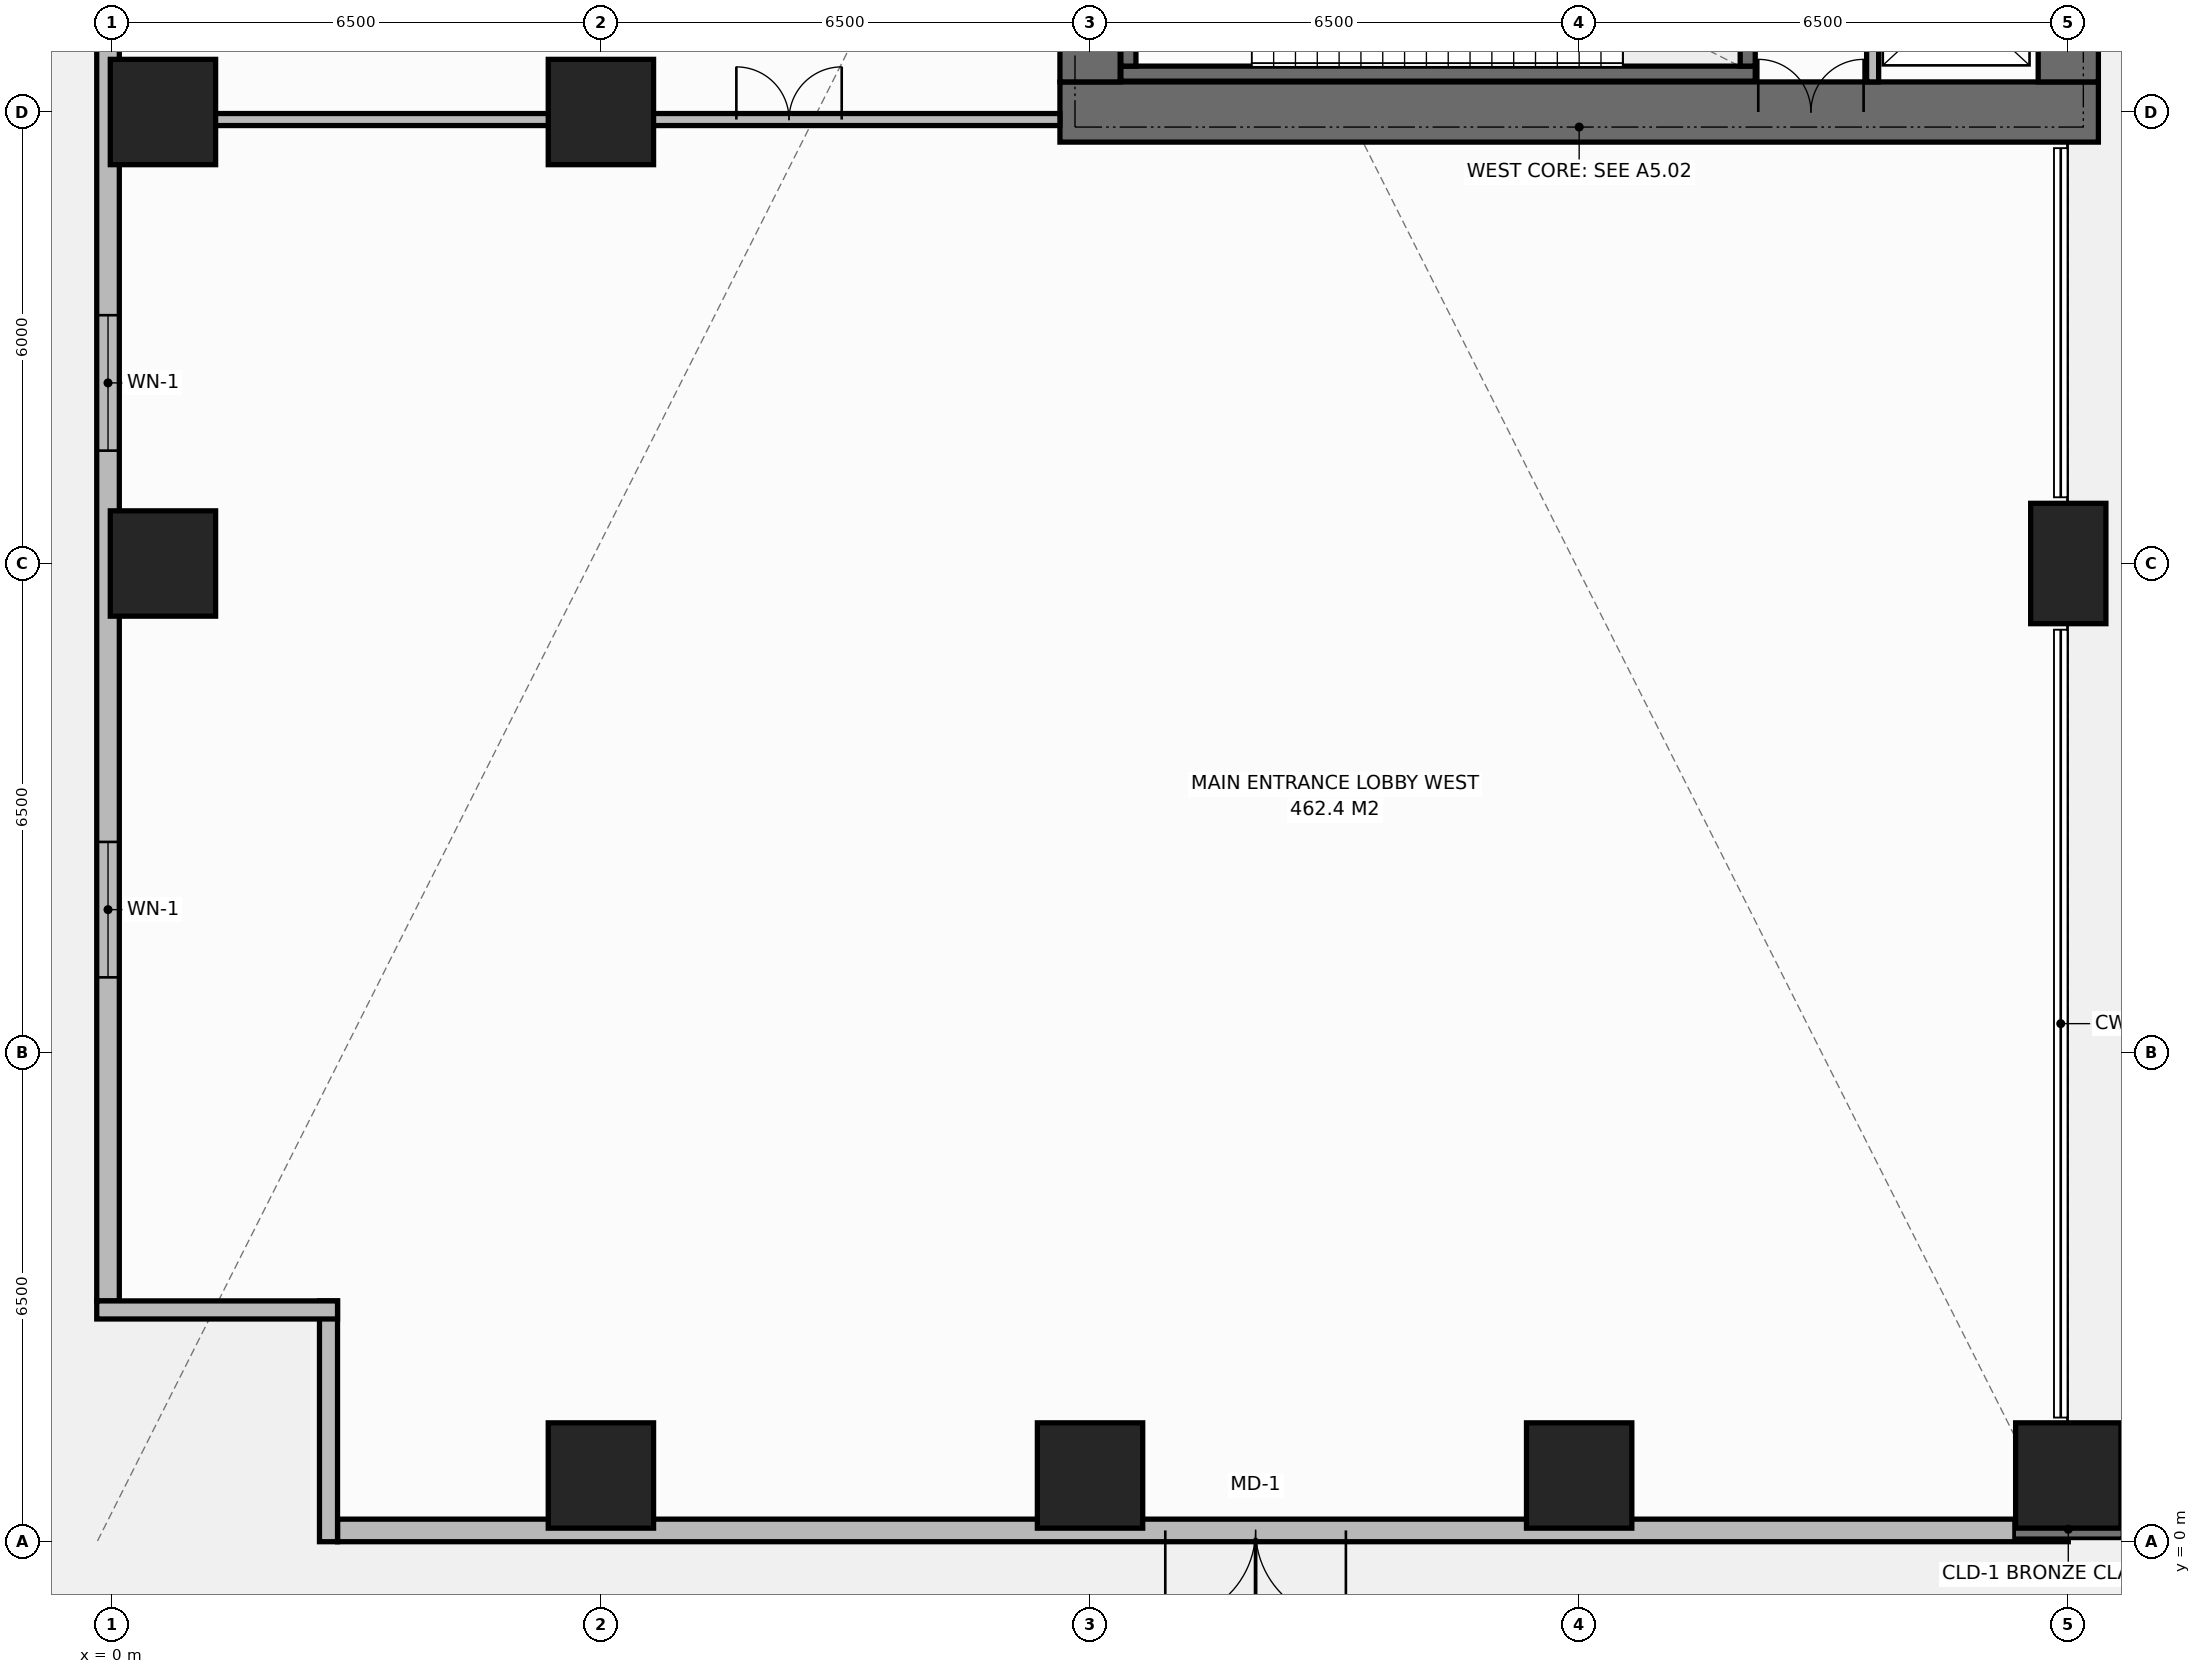
"""IFC4 building model, lengths in metres.
Left out: names, types, materials, properties, quantities, classifications, styles, units other than length and angle.
Written with IfcOpenShell. Run it as: python <this file> out.ifc"""

import sys

from ifc_helpers import new_model, si_unit, direction, frame, frame_2d, origin, origin_2d, place, context, subcontext, project, spatial, rectangle, extrude, element, fill, save


model = new_model("IFC4")
c1 = context("Model", 3, precision=1e-05, world=origin(), true_north=direction((0.0, 1.0)))
c2 = subcontext(c1, "Body", "Model", "MODEL_VIEW")
j1 = project(units=[si_unit("LENGTHUNIT", "METRE"), si_unit("PLANEANGLEUNIT", "RADIAN")], contexts=[c1])
p1 = place(None, origin())
s1 = spatial("IfcSite", under=j1, at=p1, CompositionType="ELEMENT")
p2 = place(p1, origin())
s2 = spatial("IfcBuilding", under=s1, at=p2, CompositionType="ELEMENT")
p3 = place(p2, origin())
s3 = spatial("IfcBuildingStorey", under=s2, at=p3, CompositionType="ELEMENT", Elevation=0.0)
p4 = place(p3, frame((12.6, 19.0, 0.0), z_axis=(0.0, 0.0, 1.0), x_axis=(1.0, 0.0, 0.0)))
e1 = element("IfcWall", 1, at=p4, inside=s3, PredefinedType="SHEAR", context=c2, shape_type="SweptSolid", body=[
    extrude(rectangle(XDim=13.8, YDim=0.8, at=frame_2d((6.9, 0.0))), origin(), (0.0, 0.0, 1.0), 6.0),
])
p5 = place(p4, frame((9.28, 0.0, 0.0)))
e2 = element("IfcOpeningElement", 2, at=p5, cuts=e1, PredefinedType="OPENING", context=c2, shape_type="SweptSolid", body=[
    extrude(rectangle(XDim=1.4, YDim=2.2, at=frame_2d((0.7, 1.1))), frame((0.0, 0.41, 0.0), z_axis=(0.0, -1.0, 0.0), x_axis=(1.0, 0.0, 0.0)), (0.0, 0.0, 1.0), 0.82),
])
p6 = place(p3, frame((13.0, 19.4, 0.0), z_axis=(0.0, 0.0, 1.0), x_axis=(0.0, 1.0, 0.0)))
e3 = element("IfcWall", 3, at=p6, inside=s3, PredefinedType="SHEAR", context=c2, shape_type="SweptSolid", body=[
    extrude(rectangle(XDim=13.2, YDim=0.8, at=frame_2d((6.6, 0.0))), origin(), (0.0, 0.0, 1.0), 6.0),
])
p7 = place(p6, frame((4.65, 0.0, 0.0)))
e4 = element("IfcOpeningElement", 4, at=p7, cuts=e3, PredefinedType="OPENING", context=c2, shape_type="SweptSolid", body=[
    extrude(rectangle(XDim=1.4, YDim=2.2, at=frame_2d((0.7, 1.1))), frame((0.0, 0.41, 0.0), z_axis=(0.0, -1.0, 0.0), x_axis=(1.0, 0.0, 0.0)), (0.0, 0.0, 1.0), 0.82),
])
p8 = place(p3, frame((26.0, 19.4, 0.0), z_axis=(0.0, 0.0, 1.0), x_axis=(0.0, 1.0, 0.0)))
e5 = element("IfcWall", 5, at=p8, inside=s3, PredefinedType="SHEAR", context=c2, shape_type="SweptSolid", body=[
    extrude(rectangle(XDim=13.2, YDim=0.8, at=frame_2d((6.6, 0.0))), origin(), (0.0, 0.0, 1.0), 6.0),
])
p9 = place(p3, frame((13.41, 19.51, 0.0), z_axis=(0.0, 0.0, 1.0), x_axis=(1.0, 0.0, 0.0)))
e6 = element("IfcWall", 6, at=p9, inside=s3, PredefinedType="SHEAR", context=c2, shape_type="SweptSolid", body=[
    extrude(rectangle(XDim=8.43, YDim=0.2, at=frame_2d((4.215, 0.0))), origin(), (0.0, 0.0, 1.0), 6.0),
])
for number, where, z_axis, x_axis in (
    (7, (13.51, 19.61, 0.0), (0.0, 0.0, 1.0), (0.0, 1.0, 0.0)),
    (8, (21.74, 19.61, 0.0), (0.0, 0.0, 1.0), (0.0, 1.0, 0.0)),
):
    element("IfcWall", number, at=place(p3, frame(where, z_axis=z_axis, x_axis=x_axis)), inside=s3, PredefinedType="SHEAR", context=c2, shape_type="SweptSolid", body=[
        extrude(rectangle(XDim=3.28, YDim=0.2, at=frame_2d((1.64, 0.0))), origin(), (0.0, 0.0, 1.0), 6.0),
    ])
p10 = place(p3, frame((6.5, 19.0, 0.0), z_axis=(0.0, 0.0, 1.0), x_axis=(1.0, 0.0, 0.0)))
e9 = element("IfcColumn", 9, at=p10, inside=s3, PredefinedType="COLUMN", context=c2, shape_type="SweptSolid", body=[
    extrude(rectangle(XDim=1.4, YDim=1.4, at=origin_2d()), origin(), (0.0, 0.0, 1.0), 6.0),
])
p11 = place(p3, frame((26.0, 13.0, 0.0), z_axis=(0.0, 0.0, 1.0), x_axis=(1.0, 0.0, 0.0)))
e10 = element("IfcColumn", 10, at=p11, inside=s3, PredefinedType="PILASTER", context=c2, shape_type="SweptSolid", body=[
    extrude(rectangle(XDim=1.0, YDim=1.6, at=origin_2d()), origin(), (0.0, 0.0, 1.0), 6.0),
])
for number, where, z_axis, x_axis in (
    (11, (6.5, 0.88, 0.0), (0.0, 0.0, 1.0), (1.0, 0.0, 0.0)),
    (12, (13.0, 0.88, 0.0), (0.0, 0.0, 1.0), (1.0, 0.0, 0.0)),
    (13, (19.5, 0.88, 0.0), (0.0, 0.0, 1.0), (1.0, 0.0, 0.0)),
    (14, (26.0, 0.88, 0.0), (0.0, 0.0, 1.0), (1.0, 0.0, 0.0)),
    (15, (0.68, 13.0, 0.0), (0.0, 0.0, 1.0), (1.0, 0.0, 0.0)),
    (16, (0.68, 19.0, 0.0), (0.0, 0.0, 1.0), (1.0, 0.0, 0.0)),
):
    element("IfcColumn", number, at=place(p3, frame(where, z_axis=z_axis, x_axis=x_axis)), inside=s3, PredefinedType="COLUMN", context=c2, shape_type="SweptSolid", body=[
        extrude(rectangle(XDim=1.4, YDim=1.4, at=origin_2d()), origin(), (0.0, 0.0, 1.0), 6.0),
    ])
p12 = place(p3, frame((-0.05, 3.2, 0.0), z_axis=(0.0, 0.0, 1.0), x_axis=(0.0, 1.0, 0.0)))
e17 = element("IfcWall", 17, at=p12, inside=s3, PredefinedType="STANDARD", context=c2, shape_type="SweptSolid", body=[
    extrude(rectangle(XDim=45.6, YDim=0.3, at=frame_2d((22.8, 0.0))), origin(), (0.0, 0.0, 1.0), 5.72),
])
p13 = place(p12, frame((17.8, 0.0, 0.0)))
e18 = element("IfcOpeningElement", 18, at=p13, cuts=e17, PredefinedType="OPENING", context=c2, shape_type="SweptSolid", body=[
    extrude(rectangle(XDim=2.2, YDim=2.4, at=frame_2d((1.1, 1.2))), frame((0.0, 0.16, 0.0), z_axis=(0.0, -1.0, 0.0), x_axis=(1.0, 0.0, 0.0)), (0.0, 0.0, 1.0), 0.32),
])
p14 = place(p12, frame((24.8, 0.0, 0.0)))
e19 = element("IfcOpeningElement", 19, at=p14, cuts=e17, PredefinedType="OPENING", context=c2, shape_type="SweptSolid", body=[
    extrude(rectangle(XDim=1.1, YDim=2.2, at=frame_2d((0.55, 1.1))), frame((0.0, 0.16, 0.0), z_axis=(0.0, -1.0, 0.0), x_axis=(1.0, 0.0, 0.0)), (0.0, 0.0, 1.0), 0.32),
])
p15 = place(p12, frame((4.3, 0.0, 0.9)))
e20 = element("IfcOpeningElement", 20, at=p15, cuts=e17, PredefinedType="OPENING", context=c2, shape_type="SweptSolid", body=[
    extrude(rectangle(XDim=1.8, YDim=2.2, at=frame_2d((0.9, 1.1))), frame((0.0, 0.16, 0.0), z_axis=(0.0, -1.0, 0.0), x_axis=(1.0, 0.0, 0.0)), (0.0, 0.0, 1.0), 0.32),
])
p16 = place(p12, frame((11.3, 0.0, 0.9)))
e21 = element("IfcOpeningElement", 21, at=p16, cuts=e17, PredefinedType="OPENING", context=c2, shape_type="SweptSolid", body=[
    extrude(rectangle(XDim=1.8, YDim=2.2, at=frame_2d((0.9, 1.1))), frame((0.0, 0.16, 0.0), z_axis=(0.0, -1.0, 0.0), x_axis=(1.0, 0.0, 0.0)), (0.0, 0.0, 1.0), 0.32),
])
p17 = place(p12, frame((33.0, 0.0, 0.9)))
e22 = element("IfcOpeningElement", 22, at=p17, cuts=e17, PredefinedType="OPENING", context=c2, shape_type="SweptSolid", body=[
    extrude(rectangle(XDim=1.8, YDim=2.2, at=frame_2d((0.9, 1.1))), frame((0.0, 0.16, 0.0), z_axis=(0.0, -1.0, 0.0), x_axis=(1.0, 0.0, 0.0)), (0.0, 0.0, 1.0), 0.32),
])
p18 = place(p12, frame((39.3, 0.0, 0.9)))
e23 = element("IfcOpeningElement", 23, at=p18, cuts=e17, PredefinedType="OPENING", context=c2, shape_type="SweptSolid", body=[
    extrude(rectangle(XDim=1.8, YDim=2.2, at=frame_2d((0.9, 1.1))), frame((0.0, 0.16, 0.0), z_axis=(0.0, -1.0, 0.0), x_axis=(1.0, 0.0, 0.0)), (0.0, 0.0, 1.0), 0.32),
])
p19 = place(p3, frame((26.0, 0.15, 0.0), z_axis=(0.0, 0.0, 1.0), x_axis=(-1.0, 0.0, 0.0)))
e24 = element("IfcWall", 24, at=p19, inside=s3, PredefinedType="STANDARD", context=c2, shape_type="SweptSolid", body=[
    extrude(rectangle(XDim=23.0, YDim=0.3, at=frame_2d((11.5, 0.0))), origin(), (0.0, 0.0, 1.0), 5.72),
])
p20 = place(p19, frame((9.6, 0.0, 0.0)))
e25 = element("IfcOpeningElement", 25, at=p20, cuts=e24, PredefinedType="OPENING", context=c2, shape_type="SweptSolid", body=[
    extrude(rectangle(XDim=2.4, YDim=2.6, at=frame_2d((1.2, 1.3))), frame((0.0, 0.16, 0.0), z_axis=(0.0, -1.0, 0.0), x_axis=(1.0, 0.0, 0.0)), (0.0, 0.0, 1.0), 0.32),
])
for number, where, z_axis, x_axis in (
    (26, (2.88, 0.0, 0.0), (0.0, 0.0, 1.0), (0.0, 1.0, 0.0)),
    (27, (3.0, 3.08, 0.0), (0.0, 0.0, 1.0), (-1.0, 0.0, 0.0)),
):
    element("IfcWall", number, at=place(p3, frame(where, z_axis=z_axis, x_axis=x_axis)), inside=s3, PredefinedType="STANDARD", context=c2, shape_type="SweptSolid", body=[
        extrude(rectangle(XDim=3.2, YDim=0.24, at=frame_2d((1.6, 0.0))), origin(), (0.0, 0.0, 1.0), 5.72),
    ])
p21 = place(p3, frame((23.4, 19.4, 0.0), z_axis=(0.0, 0.0, 1.0), x_axis=(0.0, 1.0, 0.0)))
e28 = element("IfcWall", 28, at=p21, inside=s3, PredefinedType="STANDARD", context=c2, shape_type="SweptSolid", body=[
    extrude(rectangle(XDim=13.2, YDim=0.16, at=frame_2d((6.6, 0.0))), origin(), (0.0, 0.0, 1.0), 5.72),
])
p22 = place(p21, frame((0.55, 0.0, 0.0)))
e29 = element("IfcOpeningElement", 29, at=p22, cuts=e28, PredefinedType="OPENING", context=c2, shape_type="SweptSolid", body=[
    extrude(rectangle(XDim=1.1, YDim=2.2, at=frame_2d((0.55, 1.1))), frame((0.0, 0.09, 0.0), z_axis=(0.0, -1.0, 0.0), x_axis=(1.0, 0.0, 0.0)), (0.0, 0.0, 1.0), 0.18),
])
p23 = place(p21, frame((2.7, 0.0, 0.0)))
e30 = element("IfcOpeningElement", 30, at=p23, cuts=e28, PredefinedType="OPENING", context=c2, shape_type="SweptSolid", body=[
    extrude(rectangle(XDim=1.1, YDim=2.2, at=frame_2d((0.55, 1.1))), frame((0.0, 0.09, 0.0), z_axis=(0.0, -1.0, 0.0), x_axis=(1.0, 0.0, 0.0)), (0.0, 0.0, 1.0), 0.18),
])
p24 = place(p21, frame((4.9, 0.0, 0.0)))
e31 = element("IfcOpeningElement", 31, at=p24, cuts=e28, PredefinedType="OPENING", context=c2, shape_type="SweptSolid", body=[
    extrude(rectangle(XDim=1.1, YDim=2.2, at=frame_2d((0.55, 1.1))), frame((0.0, 0.09, 0.0), z_axis=(0.0, -1.0, 0.0), x_axis=(1.0, 0.0, 0.0)), (0.0, 0.0, 1.0), 0.18),
])
p25 = place(p21, frame((7.05, 0.0, 0.0)))
e32 = element("IfcOpeningElement", 32, at=p25, cuts=e28, PredefinedType="OPENING", context=c2, shape_type="SweptSolid", body=[
    extrude(rectangle(XDim=1.1, YDim=2.2, at=frame_2d((0.55, 1.1))), frame((0.0, 0.09, 0.0), z_axis=(0.0, -1.0, 0.0), x_axis=(1.0, 0.0, 0.0)), (0.0, 0.0, 1.0), 0.18),
])
p26 = place(p21, frame((9.2, 0.0, 0.0)))
e33 = element("IfcOpeningElement", 33, at=p26, cuts=e28, PredefinedType="OPENING", context=c2, shape_type="SweptSolid", body=[
    extrude(rectangle(XDim=1.1, YDim=2.2, at=frame_2d((0.55, 1.1))), frame((0.0, 0.09, 0.0), z_axis=(0.0, -1.0, 0.0), x_axis=(1.0, 0.0, 0.0)), (0.0, 0.0, 1.0), 0.18),
])
p27 = place(p21, frame((11.4, 0.0, 0.0)))
e34 = element("IfcOpeningElement", 34, at=p27, cuts=e28, PredefinedType="OPENING", context=c2, shape_type="SweptSolid", body=[
    extrude(rectangle(XDim=1.1, YDim=2.2, at=frame_2d((0.55, 1.1))), frame((0.0, 0.09, 0.0), z_axis=(0.0, -1.0, 0.0), x_axis=(1.0, 0.0, 0.0)), (0.0, 0.0, 1.0), 0.18),
])
p28 = place(p3, frame((0.1, 18.9, 0.0), z_axis=(0.0, 0.0, 1.0), x_axis=(1.0, 0.0, 0.0)))
e35 = element("IfcWall", 35, at=p28, inside=s3, PredefinedType="STANDARD", context=c2, shape_type="SweptSolid", body=[
    extrude(rectangle(XDim=12.5, YDim=0.16, at=frame_2d((6.25, 0.0))), origin(), (0.0, 0.0, 1.0), 4.92),
])
p29 = place(p28, frame((8.2, 0.0, 0.0)))
e36 = element("IfcOpeningElement", 36, at=p29, cuts=e35, PredefinedType="OPENING", context=c2, shape_type="SweptSolid", body=[
    extrude(rectangle(XDim=1.4, YDim=2.2, at=frame_2d((0.7, 1.1))), frame((0.0, 0.09, 0.0), z_axis=(0.0, -1.0, 0.0), x_axis=(1.0, 0.0, 0.0)), (0.0, 0.0, 1.0), 0.18),
])
p30 = place(p15, origin())
e37 = element("IfcWindow", 37, at=p30, inside=s3, PartitioningType="SINGLE_PANEL", PredefinedType="WINDOW", context=c2, shape_type="SweptSolid", body=[
    extrude(rectangle(XDim=1.8, YDim=2.2, at=frame_2d((0.9, 1.1))), frame((0.0, 0.03, 0.0), z_axis=(0.0, -1.0, 0.0), x_axis=(1.0, 0.0, 0.0)), (0.0, 0.0, 1.0), 0.06),
])
fill(e20, e37)
p31 = place(p16, origin())
e38 = element("IfcWindow", 38, at=p31, inside=s3, PartitioningType="SINGLE_PANEL", PredefinedType="WINDOW", context=c2, shape_type="SweptSolid", body=[
    extrude(rectangle(XDim=1.8, YDim=2.2, at=frame_2d((0.9, 1.1))), frame((0.0, 0.03, 0.0), z_axis=(0.0, -1.0, 0.0), x_axis=(1.0, 0.0, 0.0)), (0.0, 0.0, 1.0), 0.06),
])
fill(e21, e38)
p32 = place(p20, origin())
e39 = element("IfcDoor", 39, at=p32, inside=s3, OperationType="DOUBLE_DOOR_SINGLE_SWING", PredefinedType="DOOR", context=c2, shape_type="SweptSolid", body=[
    extrude(rectangle(XDim=2.4, YDim=2.6, at=frame_2d((1.2, 1.3))), frame((0.0, 0.025, 0.0), z_axis=(0.0, -1.0, 0.0), x_axis=(1.0, 0.0, 0.0)), (0.0, 0.0, 1.0), 0.05),
])
fill(e25, e39)
p33 = place(p5, origin())
e40 = element("IfcDoor", 40, at=p33, inside=s3, OperationType="DOUBLE_DOOR_SINGLE_SWING", PredefinedType="DOOR", context=c2, shape_type="SweptSolid", body=[
    extrude(rectangle(XDim=1.4, YDim=2.2, at=frame_2d((0.7, 1.1))), frame((0.0, 0.125, 0.0), z_axis=(0.0, -1.0, 0.0), x_axis=(1.0, 0.0, 0.0)), (0.0, 0.0, 1.0), 0.05),
])
fill(e2, e40)
p34 = place(p29, origin())
e41 = element("IfcDoor", 41, at=p34, inside=s3, OperationType="DOUBLE_DOOR_SINGLE_SWING", PredefinedType="DOOR", context=c2, shape_type="SweptSolid", body=[
    extrude(rectangle(XDim=1.4, YDim=2.2, at=frame_2d((0.7, 1.1))), frame((0.0, 0.025, 0.0), z_axis=(0.0, -1.0, 0.0), x_axis=(1.0, 0.0, 0.0)), (0.0, 0.0, 1.0), 0.05),
])
fill(e36, e41)
save(model, sys.argv[1])
